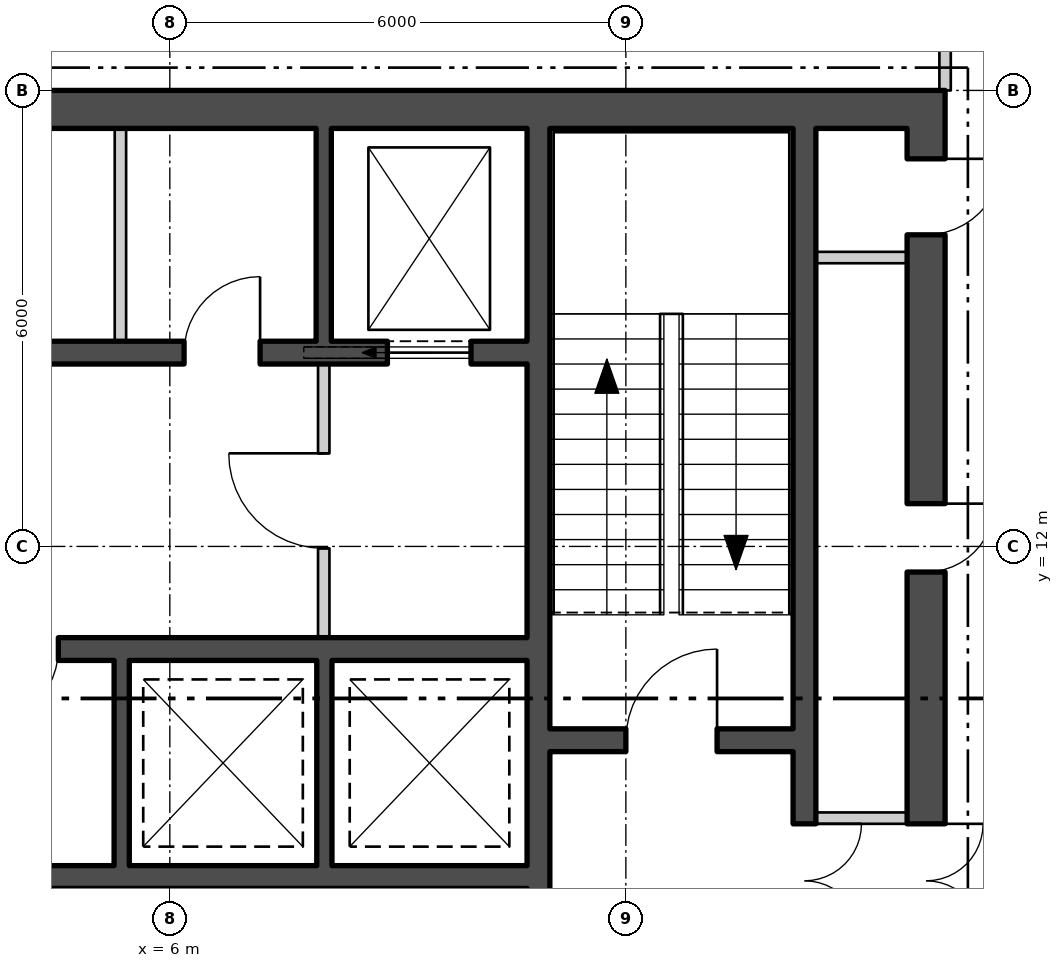
"""IFC4 building model, lengths in metres.
Left out: names, types, materials, properties, quantities, classifications, styles, units other than length and angle.
Written with IfcOpenShell. Run it as: python <this file> out.ifc"""

import sys

from ifc_helpers import new_model, si_unit, direction, frame, frame_2d, origin, place, context, subcontext, project, spatial, polyline, rectangle, outline, extrude, element, fill, save


model = new_model("IFC4")
c1 = context("Model", 3, precision=1e-05, world=origin(), true_north=direction((0.0, 1.0)))
c2 = subcontext(c1, "Body", "Model", "MODEL_VIEW")
j1 = project(units=[si_unit("LENGTHUNIT", "METRE"), si_unit("PLANEANGLEUNIT", "RADIAN")], contexts=[c1])
p1 = place(None, origin())
s1 = spatial("IfcSite", under=j1, at=p1, CompositionType="ELEMENT")
p2 = place(p1, origin())
s2 = spatial("IfcBuilding", under=s1, at=p2, CompositionType="ELEMENT")
p3 = place(p2, frame((0.0, 0.0, 163.2)))
s3 = spatial("IfcBuildingStorey", under=s2, at=p3, CompositionType="ELEMENT", Elevation=163.2)
p4 = place(p3, frame((4.055, -26.661, -0.18), z_axis=(0.0, 0.0, 1.0), x_axis=(0.499999764979, 0.866025539474, 0.0)))
e1 = element("IfcWall", 1, at=p4, inside=s3, PredefinedType="SOLIDWALL", context=c2, shape_type="SweptSolid", body=[
    extrude(outline(polyline([(-0.13, -0.225), (45.87, -0.225), (45.61, 0.225), (0.13, 0.225), (-0.13, -0.225)])), origin(), (0.0, 0.0, 1.0), 3.68),
])
p5 = place(p4, frame((1.424, 0.0, 1.08)))
e2 = element("IfcOpeningElement", 2, at=p5, cuts=e1, PredefinedType="OPENING", context=c2, shape_type="SweptSolid", body=[
    extrude(rectangle(XDim=2.4, YDim=2.0, at=frame_2d((1.2, 1.0))), frame((0.0, 0.235, 0.0), z_axis=(0.0, -1.0, 0.0), x_axis=(1.0, 0.0, 0.0)), (0.0, 0.0, 1.0), 0.47),
])
p6 = place(p4, frame((5.893, 0.0, 1.08)))
e3 = element("IfcOpeningElement", 3, at=p6, cuts=e1, PredefinedType="OPENING", context=c2, shape_type="SweptSolid", body=[
    extrude(rectangle(XDim=2.4, YDim=2.0, at=frame_2d((1.2, 1.0))), frame((0.0, 0.235, 0.0), z_axis=(0.0, -1.0, 0.0), x_axis=(1.0, 0.0, 0.0)), (0.0, 0.0, 1.0), 0.47),
])
p7 = place(p4, frame((10.401, 0.0, 1.08)))
e4 = element("IfcOpeningElement", 4, at=p7, cuts=e1, PredefinedType="OPENING", context=c2, shape_type="SweptSolid", body=[
    extrude(rectangle(XDim=2.4, YDim=2.0, at=frame_2d((1.2, 1.0))), frame((0.0, 0.235, 0.0), z_axis=(0.0, -1.0, 0.0), x_axis=(1.0, 0.0, 0.0)), (0.0, 0.0, 1.0), 0.47),
])
p8 = place(p4, frame((14.909, 0.0, 1.08)))
e5 = element("IfcOpeningElement", 5, at=p8, cuts=e1, PredefinedType="OPENING", context=c2, shape_type="SweptSolid", body=[
    extrude(rectangle(XDim=2.4, YDim=2.0, at=frame_2d((1.2, 1.0))), frame((0.0, 0.235, 0.0), z_axis=(0.0, -1.0, 0.0), x_axis=(1.0, 0.0, 0.0)), (0.0, 0.0, 1.0), 0.47),
])
p9 = place(p4, frame((19.416, 0.0, 1.08)))
e6 = element("IfcOpeningElement", 6, at=p9, cuts=e1, PredefinedType="OPENING", context=c2, shape_type="SweptSolid", body=[
    extrude(rectangle(XDim=2.4, YDim=2.0, at=frame_2d((1.2, 1.0))), frame((0.0, 0.235, 0.0), z_axis=(0.0, -1.0, 0.0), x_axis=(1.0, 0.0, 0.0)), (0.0, 0.0, 1.0), 0.47),
])
p10 = place(p4, frame((23.924, 0.0, 1.08)))
e7 = element("IfcOpeningElement", 7, at=p10, cuts=e1, PredefinedType="OPENING", context=c2, shape_type="SweptSolid", body=[
    extrude(rectangle(XDim=2.4, YDim=2.0, at=frame_2d((1.2, 1.0))), frame((0.0, 0.235, 0.0), z_axis=(0.0, -1.0, 0.0), x_axis=(1.0, 0.0, 0.0)), (0.0, 0.0, 1.0), 0.47),
])
p11 = place(p4, frame((28.431, 0.0, 1.08)))
e8 = element("IfcOpeningElement", 8, at=p11, cuts=e1, PredefinedType="OPENING", context=c2, shape_type="SweptSolid", body=[
    extrude(rectangle(XDim=2.4, YDim=2.0, at=frame_2d((1.2, 1.0))), frame((0.0, 0.235, 0.0), z_axis=(0.0, -1.0, 0.0), x_axis=(1.0, 0.0, 0.0)), (0.0, 0.0, 1.0), 0.47),
])
p12 = place(p4, frame((32.939, 0.0, 1.08)))
e9 = element("IfcOpeningElement", 9, at=p12, cuts=e1, PredefinedType="OPENING", context=c2, shape_type="SweptSolid", body=[
    extrude(rectangle(XDim=2.4, YDim=2.0, at=frame_2d((1.2, 1.0))), frame((0.0, 0.235, 0.0), z_axis=(0.0, -1.0, 0.0), x_axis=(1.0, 0.0, 0.0)), (0.0, 0.0, 1.0), 0.47),
])
p13 = place(p4, frame((37.447, 0.0, 1.08)))
e10 = element("IfcOpeningElement", 10, at=p13, cuts=e1, PredefinedType="OPENING", context=c2, shape_type="SweptSolid", body=[
    extrude(rectangle(XDim=2.4, YDim=2.0, at=frame_2d((1.2, 1.0))), frame((0.0, 0.235, 0.0), z_axis=(0.0, -1.0, 0.0), x_axis=(1.0, 0.0, 0.0)), (0.0, 0.0, 1.0), 0.47),
])
p14 = place(p4, frame((41.916, 0.0, 1.08)))
e11 = element("IfcOpeningElement", 11, at=p14, cuts=e1, PredefinedType="OPENING", context=c2, shape_type="SweptSolid", body=[
    extrude(rectangle(XDim=2.4, YDim=2.0, at=frame_2d((1.2, 1.0))), frame((0.0, 0.235, 0.0), z_axis=(0.0, -1.0, 0.0), x_axis=(1.0, 0.0, 0.0)), (0.0, 0.0, 1.0), 0.47),
])
p15 = place(p3, frame((-16.2, 17.75, 0.0), z_axis=(0.0, 0.0, 1.0), x_axis=(1.0, 0.0, 0.0)))
e12 = element("IfcWall", 12, at=p15, inside=s3, PredefinedType="SHEAR", context=c2, shape_type="SweptSolid", body=[
    extrude(rectangle(XDim=32.4, YDim=0.5, at=frame_2d((16.2, 0.0))), origin(), (0.0, 0.0, 1.0), 3.7),
])
p16 = place(p3, frame((15.95, 2.5, 0.0), z_axis=(0.0, 0.0, 1.0), x_axis=(0.0, 1.0, 0.0)))
e13 = element("IfcWall", 13, at=p16, inside=s3, PredefinedType="SHEAR", context=c2, shape_type="SweptSolid", body=[
    extrude(rectangle(XDim=15.0, YDim=0.5, at=frame_2d((7.5, 0.0))), origin(), (0.0, 0.0, 1.0), 3.7),
])
p17 = place(p16, frame((4.35, 0.0, 0.0)))
e14 = element("IfcOpeningElement", 14, at=p17, cuts=e13, PredefinedType="OPENING", context=c2, shape_type="SweptSolid", body=[
    extrude(rectangle(XDim=1.5, YDim=2.1, at=frame_2d((0.75, 1.05))), frame((0.0, 0.26, 0.0), z_axis=(0.0, -1.0, 0.0), x_axis=(1.0, 0.0, 0.0)), (0.0, 0.0, 1.0), 0.52),
])
p18 = place(p16, frame((0.4, 0.0, 0.0)))
e15 = element("IfcOpeningElement", 15, at=p18, cuts=e13, PredefinedType="OPENING", context=c2, shape_type="SweptSolid", body=[
    extrude(rectangle(XDim=0.9, YDim=2.1, at=frame_2d((0.45, 1.05))), frame((0.0, 0.26, 0.0), z_axis=(0.0, -1.0, 0.0), x_axis=(1.0, 0.0, 0.0)), (0.0, 0.0, 1.0), 0.52),
])
p19 = place(p16, frame((2.475, 0.0, 0.0)))
e16 = element("IfcOpeningElement", 16, at=p19, cuts=e13, PredefinedType="OPENING", context=c2, shape_type="SweptSolid", body=[
    extrude(rectangle(XDim=0.9, YDim=2.1, at=frame_2d((0.45, 1.05))), frame((0.0, 0.26, 0.0), z_axis=(0.0, -1.0, 0.0), x_axis=(1.0, 0.0, 0.0)), (0.0, 0.0, 1.0), 0.52),
])
p20 = place(p16, frame((9.163, 0.0, 0.0)))
e17 = element("IfcOpeningElement", 17, at=p20, cuts=e13, PredefinedType="OPENING", context=c2, shape_type="SweptSolid", body=[
    extrude(rectangle(XDim=0.9, YDim=2.1, at=frame_2d((0.45, 1.05))), frame((0.0, 0.26, 0.0), z_axis=(0.0, -1.0, 0.0), x_axis=(1.0, 0.0, 0.0)), (0.0, 0.0, 1.0), 0.52),
])
p21 = place(p16, frame((13.6, 0.0, 0.0)))
e18 = element("IfcOpeningElement", 18, at=p21, cuts=e13, PredefinedType="OPENING", context=c2, shape_type="SweptSolid", body=[
    extrude(rectangle(XDim=1.0, YDim=2.1, at=frame_2d((0.5, 1.05))), frame((0.0, 0.26, 0.0), z_axis=(0.0, -1.0, 0.0), x_axis=(1.0, 0.0, 0.0)), (0.0, 0.0, 1.0), 0.52),
])
p22 = place(p3, frame((10.85, 2.5, 0.0), z_axis=(0.0, 0.0, 1.0), x_axis=(0.0, 1.0, 0.0)))
e19 = element("IfcWall", 19, at=p22, inside=s3, PredefinedType="SHEAR", context=c2, shape_type="SweptSolid", body=[
    extrude(rectangle(XDim=15.0, YDim=0.3, at=frame_2d((7.5, 0.0))), origin(), (0.0, 0.0, 1.0), 3.7),
])
p23 = place(p22, frame((3.475, 0.0, 0.0)))
e20 = element("IfcOpeningElement", 20, at=p23, cuts=e19, PredefinedType="OPENING", context=c2, shape_type="SweptSolid", body=[
    extrude(rectangle(XDim=1.25, YDim=2.1, at=frame_2d((0.625, 1.05))), frame((0.0, 0.16, 0.0), z_axis=(0.0, -1.0, 0.0), x_axis=(1.0, 0.0, 0.0)), (0.0, 0.0, 1.0), 0.32),
])
p24 = place(p22, frame((1.125, 0.0, 0.0)))
e21 = element("IfcOpeningElement", 21, at=p24, cuts=e19, PredefinedType="OPENING", context=c2, shape_type="SweptSolid", body=[
    extrude(rectangle(XDim=1.0, YDim=2.1, at=frame_2d((0.5, 1.05))), frame((0.0, 0.16, 0.0), z_axis=(0.0, -1.0, 0.0), x_axis=(1.0, 0.0, 0.0)), (0.0, 0.0, 1.0), 0.32),
])
p25 = place(p3, frame((14.35, 2.5, 0.0), z_axis=(0.0, 0.0, 1.0), x_axis=(0.0, 1.0, 0.0)))
e22 = element("IfcWall", 22, at=p25, inside=s3, PredefinedType="SHEAR", context=c2, shape_type="SweptSolid", body=[
    extrude(rectangle(XDim=15.0, YDim=0.3, at=frame_2d((7.5, 0.0))), origin(), (0.0, 0.0, 1.0), 3.7),
])
p26 = place(p25, frame((4.35, 0.0, 0.0)))
e23 = element("IfcOpeningElement", 23, at=p26, cuts=e22, PredefinedType="OPENING", context=c2, shape_type="SweptSolid", body=[
    extrude(rectangle(XDim=1.5, YDim=2.1, at=frame_2d((0.75, 1.05))), frame((0.0, 0.16, 0.0), z_axis=(0.0, -1.0, 0.0), x_axis=(1.0, 0.0, 0.0)), (0.0, 0.0, 1.0), 0.32),
])
p27 = place(p3, frame((11.0, 9.45, 0.0), z_axis=(0.0, 0.0, 1.0), x_axis=(1.0, 0.0, 0.0)))
e24 = element("IfcWall", 24, at=p27, inside=s3, PredefinedType="SHEAR", context=c2, shape_type="SweptSolid", body=[
    extrude(rectangle(XDim=3.2, YDim=0.3, at=frame_2d((1.6, 0.0))), origin(), (0.0, 0.0, 1.0), 3.7),
])
p28 = place(p27, frame((1.0, 0.0, 0.0)))
e25 = element("IfcOpeningElement", 25, at=p28, cuts=e24, PredefinedType="OPENING", context=c2, shape_type="SweptSolid", body=[
    extrude(rectangle(XDim=1.2, YDim=2.1, at=frame_2d((0.6, 1.05))), frame((0.0, 0.16, 0.0), z_axis=(0.0, -1.0, 0.0), x_axis=(1.0, 0.0, 0.0)), (0.0, 0.0, 1.0), 0.32),
])
p29 = place(p3, frame((-10.7, 14.55, 0.0), z_axis=(0.0, 0.0, 1.0), x_axis=(1.0, 0.0, 0.0)))
e26 = element("IfcWall", 26, at=p29, inside=s3, PredefinedType="SHEAR", context=c2, shape_type="SweptSolid", body=[
    extrude(rectangle(XDim=21.4, YDim=0.3, at=frame_2d((10.7, 0.0))), origin(), (0.0, 0.0, 1.0), 3.7),
])
p30 = place(p29, frame((0.738, 0.0, 0.0)))
e27 = element("IfcOpeningElement", 27, at=p30, cuts=e26, PredefinedType="OPENING", context=c2, shape_type="SweptSolid", body=[
    extrude(rectangle(XDim=1.1, YDim=2.1, at=frame_2d((0.55, 1.05))), frame((0.0, 0.16, 0.0), z_axis=(0.0, -1.0, 0.0), x_axis=(1.0, 0.0, 0.0)), (0.0, 0.0, 1.0), 0.32),
])
p31 = place(p29, frame((3.462, 0.0, 0.0)))
e28 = element("IfcOpeningElement", 28, at=p31, cuts=e26, PredefinedType="OPENING", context=c2, shape_type="SweptSolid", body=[
    extrude(rectangle(XDim=1.1, YDim=2.1, at=frame_2d((0.55, 1.05))), frame((0.0, 0.16, 0.0), z_axis=(0.0, -1.0, 0.0), x_axis=(1.0, 0.0, 0.0)), (0.0, 0.0, 1.0), 0.32),
])
p32 = place(p29, frame((6.138, 0.0, 0.0)))
e29 = element("IfcOpeningElement", 29, at=p32, cuts=e26, PredefinedType="OPENING", context=c2, shape_type="SweptSolid", body=[
    extrude(rectangle(XDim=1.1, YDim=2.1, at=frame_2d((0.55, 1.05))), frame((0.0, 0.16, 0.0), z_axis=(0.0, -1.0, 0.0), x_axis=(1.0, 0.0, 0.0)), (0.0, 0.0, 1.0), 0.32),
])
p33 = place(p29, frame((8.812, 0.0, 0.0)))
e30 = element("IfcOpeningElement", 30, at=p33, cuts=e26, PredefinedType="OPENING", context=c2, shape_type="SweptSolid", body=[
    extrude(rectangle(XDim=1.1, YDim=2.1, at=frame_2d((0.55, 1.05))), frame((0.0, 0.16, 0.0), z_axis=(0.0, -1.0, 0.0), x_axis=(1.0, 0.0, 0.0)), (0.0, 0.0, 1.0), 0.32),
])
p34 = place(p29, frame((19.562, 0.0, 0.0)))
e31 = element("IfcOpeningElement", 31, at=p34, cuts=e26, PredefinedType="OPENING", context=c2, shape_type="SweptSolid", body=[
    extrude(rectangle(XDim=1.1, YDim=2.1, at=frame_2d((0.55, 1.05))), frame((0.0, 0.16, 0.0), z_axis=(0.0, -1.0, 0.0), x_axis=(1.0, 0.0, 0.0)), (0.0, 0.0, 1.0), 0.32),
])
p35 = place(p29, frame((12.875, 0.0, 0.0)))
e32 = element("IfcOpeningElement", 32, at=p35, cuts=e26, PredefinedType="OPENING", context=c2, shape_type="SweptSolid", body=[
    extrude(rectangle(XDim=1.0, YDim=2.1, at=frame_2d((0.5, 1.05))), frame((0.0, 0.16, 0.0), z_axis=(0.0, -1.0, 0.0), x_axis=(1.0, 0.0, 0.0)), (0.0, 0.0, 1.0), 0.32),
])
p36 = place(p29, frame((16.887, 0.0, 0.0)))
e33 = element("IfcOpeningElement", 33, at=p36, cuts=e26, PredefinedType="OPENING", context=c2, shape_type="SweptSolid", body=[
    extrude(rectangle(XDim=1.0, YDim=2.1, at=frame_2d((0.5, 1.05))), frame((0.0, 0.16, 0.0), z_axis=(0.0, -1.0, 0.0), x_axis=(1.0, 0.0, 0.0)), (0.0, 0.0, 1.0), 0.32),
])
p37 = place(p3, frame((2.6, 10.65, 0.0), z_axis=(0.0, 0.0, 1.0), x_axis=(1.0, 0.0, 0.0)))
e34 = element("IfcWall", 34, at=p37, inside=s3, PredefinedType="SHEAR", context=c2, shape_type="SweptSolid", body=[
    extrude(rectangle(XDim=8.1, YDim=0.3, at=frame_2d((4.05, 0.0))), origin(), (0.0, 0.0, 1.0), 3.7),
])
p38 = place(p37, frame((0.933, 0.0, 0.0)))
e35 = element("IfcOpeningElement", 35, at=p38, cuts=e34, PredefinedType="OPENING", context=c2, shape_type="SweptSolid", body=[
    extrude(rectangle(XDim=1.0, YDim=2.1, at=frame_2d((0.5, 1.05))), frame((0.0, 0.16, 0.0), z_axis=(0.0, -1.0, 0.0), x_axis=(1.0, 0.0, 0.0)), (0.0, 0.0, 1.0), 0.32),
])
p39 = place(p3, frame((2.6, 7.65, 0.0), z_axis=(0.0, 0.0, 1.0), x_axis=(1.0, 0.0, 0.0)))
e36 = element("IfcWall", 36, at=p39, inside=s3, PredefinedType="SHEAR", context=c2, shape_type="SweptSolid", body=[
    extrude(rectangle(XDim=8.1, YDim=0.3, at=frame_2d((4.05, 0.0))), origin(), (0.0, 0.0, 1.0), 3.7),
])
p40 = place(p3, frame((5.35, 14.7, 0.0), z_axis=(0.0, 0.0, 1.0), x_axis=(0.0, 1.0, 0.0)))
e37 = element("IfcWall", 37, at=p40, inside=s3, PredefinedType="PARTITIONING", context=c2, shape_type="SweptSolid", body=[
    extrude(rectangle(XDim=2.8, YDim=0.15, at=frame_2d((1.4, 0.0))), origin(), (0.0, 0.0, 1.0), 3.7),
])
p41 = place(p3, frame((8.025, 14.7, 0.0), z_axis=(0.0, 0.0, 1.0), x_axis=(0.0, 1.0, 0.0)))
e38 = element("IfcWall", 38, at=p41, inside=s3, PredefinedType="SHEAR", context=c2, shape_type="SweptSolid", body=[
    extrude(rectangle(XDim=2.8, YDim=0.2, at=frame_2d((1.4, 0.0))), origin(), (0.0, 0.0, 1.0), 3.7),
])
for number, where, z_axis, x_axis in (
    (39, (5.367, 7.8, 0.0), (0.0, 0.0, 1.0), (0.0, 1.0, 0.0)),
    (40, (8.033, 7.8, 0.0), (0.0, 0.0, 1.0), (0.0, 1.0, 0.0)),
):
    element("IfcWall", number, at=place(p3, frame(where, z_axis=z_axis, x_axis=x_axis)), inside=s3, PredefinedType="SHEAR", context=c2, shape_type="SweptSolid", body=[
        extrude(rectangle(XDim=2.7, YDim=0.2, at=frame_2d((1.35, 0.0))), origin(), (0.0, 0.0, 1.0), 3.7),
    ])
p42 = place(p3, frame((8.025, 10.8, 0.0), z_axis=(0.0, 0.0, 1.0), x_axis=(0.0, 1.0, 0.0)))
e41 = element("IfcWall", 41, at=p42, inside=s3, PredefinedType="PARTITIONING", context=c2, shape_type="SweptSolid", body=[
    extrude(rectangle(XDim=3.6, YDim=0.15, at=frame_2d((1.8, 0.0))), origin(), (0.0, 0.0, 1.0), 3.7),
])
p43 = place(p42, frame((1.175, 0.0, 0.0)))
e42 = element("IfcOpeningElement", 42, at=p43, cuts=e41, PredefinedType="OPENING", context=c2, shape_type="SweptSolid", body=[
    extrude(rectangle(XDim=1.25, YDim=2.1, at=frame_2d((0.625, 1.05))), frame((0.0, 0.085, 0.0), z_axis=(0.0, -1.0, 0.0), x_axis=(1.0, 0.0, 0.0)), (0.0, 0.0, 1.0), 0.17),
])
for number, where, z_axis, x_axis in (
    (43, (14.5, 8.425, 0.0), (0.0, 0.0, 1.0), (1.0, 0.0, 0.0)),
    (44, (14.5, 15.801, 0.0), (0.0, 0.0, 1.0), (1.0, 0.0, 0.0)),
):
    element("IfcWall", number, at=place(p3, frame(where, z_axis=z_axis, x_axis=x_axis)), inside=s3, PredefinedType="PARTITIONING", context=c2, shape_type="SweptSolid", body=[
        extrude(rectangle(XDim=1.2, YDim=0.15, at=frame_2d((0.6, 0.0))), origin(), (0.0, 0.0, 1.0), 3.7),
    ])
p44 = place(p3, frame((16.2, 18.0, 0.0), z_axis=(0.0, 0.0, 1.0), x_axis=(0.0, 1.0, 0.0)))
e45 = element("IfcWall", 45, at=p44, inside=s3, PredefinedType="PARTITIONING", context=c2, shape_type="SweptSolid", body=[
    extrude(rectangle(XDim=1.75, YDim=0.15, at=frame_2d((0.875, 0.0))), origin(), (0.0, 0.0, 1.0), 3.7),
])
p45 = place(p34, origin())
e46 = element("IfcDoor", 46, at=p45, inside=s3, OperationType="SLIDING_TO_LEFT", PredefinedType="DOOR", context=c2, shape_type="SweptSolid", body=[
    extrude(rectangle(XDim=1.1, YDim=2.1, at=frame_2d((0.55, 1.05))), frame((0.0, 0.025, 0.0), z_axis=(0.0, -1.0, 0.0), x_axis=(1.0, 0.0, 0.0)), (0.0, 0.0, 1.0), 0.05),
])
fill(e31, e46)
p46 = place(p36, origin())
e47 = element("IfcDoor", 47, at=p46, inside=s3, OperationType="SINGLE_SWING_LEFT", PredefinedType="DOOR", context=c2, shape_type="SweptSolid", body=[
    extrude(rectangle(XDim=1.0, YDim=2.1, at=frame_2d((0.5, 1.05))), frame((0.0, 0.025, 0.0), z_axis=(0.0, -1.0, 0.0), x_axis=(1.0, 0.0, 0.0)), (0.0, 0.0, 1.0), 0.05),
])
fill(e33, e47)
p47 = place(p38, origin())
e48 = element("IfcDoor", 48, at=p47, inside=s3, OperationType="SINGLE_SWING_LEFT", PredefinedType="DOOR", context=c2, shape_type="SweptSolid", body=[
    extrude(rectangle(XDim=1.0, YDim=2.1, at=frame_2d((0.5, 1.05))), frame((0.0, 0.025, 0.0), z_axis=(0.0, -1.0, 0.0), x_axis=(1.0, 0.0, 0.0)), (0.0, 0.0, 1.0), 0.05),
])
fill(e35, e48)
p48 = place(p43, origin())
e49 = element("IfcDoor", 49, at=p48, inside=s3, OperationType="SINGLE_SWING_LEFT", PredefinedType="DOOR", context=c2, shape_type="SweptSolid", body=[
    extrude(rectangle(XDim=1.25, YDim=2.1, at=frame_2d((0.625, 1.05))), frame((0.0, 0.025, 0.0), z_axis=(0.0, -1.0, 0.0), x_axis=(1.0, 0.0, 0.0)), (0.0, 0.0, 1.0), 0.05),
])
fill(e42, e49)
p49 = place(p28, origin())
e50 = element("IfcDoor", 50, at=p49, inside=s3, OperationType="SINGLE_SWING_LEFT", PredefinedType="DOOR", context=c2, shape_type="SweptSolid", body=[
    extrude(rectangle(XDim=1.2, YDim=2.1, at=frame_2d((0.6, 1.05))), frame((0.0, 0.025, 0.0), z_axis=(0.0, -1.0, 0.0), x_axis=(1.0, 0.0, 0.0)), (0.0, 0.0, 1.0), 0.05),
])
fill(e25, e50)
p50 = place(p26, origin())
e51 = element("IfcDoor", 51, at=p50, inside=s3, OperationType="DOUBLE_DOOR_SINGLE_SWING", PredefinedType="DOOR", context=c2, shape_type="SweptSolid", body=[
    extrude(rectangle(XDim=1.5, YDim=2.1, at=frame_2d((0.75, 1.05))), frame((0.0, 0.025, 0.0), z_axis=(0.0, -1.0, 0.0), x_axis=(1.0, 0.0, 0.0)), (0.0, 0.0, 1.0), 0.05),
])
fill(e23, e51)
p51 = place(p17, origin())
e52 = element("IfcDoor", 52, at=p51, inside=s3, OperationType="DOUBLE_DOOR_SINGLE_SWING", PredefinedType="DOOR", context=c2, shape_type="SweptSolid", body=[
    extrude(rectangle(XDim=1.5, YDim=2.1, at=frame_2d((0.75, 1.05))), frame((0.0, 0.025, 0.0), z_axis=(0.0, -1.0, 0.0), x_axis=(1.0, 0.0, 0.0)), (0.0, 0.0, 1.0), 0.05),
])
fill(e14, e52)
p52 = place(p20, origin())
e53 = element("IfcDoor", 53, at=p52, inside=s3, OperationType="SINGLE_SWING_RIGHT", PredefinedType="DOOR", context=c2, shape_type="SweptSolid", body=[
    extrude(rectangle(XDim=0.9, YDim=2.1, at=frame_2d((0.45, 1.05))), frame((0.0, 0.025, 0.0), z_axis=(0.0, -1.0, 0.0), x_axis=(1.0, 0.0, 0.0)), (0.0, 0.0, 1.0), 0.05),
])
fill(e17, e53)
p53 = place(p21, origin())
e54 = element("IfcDoor", 54, at=p53, inside=s3, OperationType="SINGLE_SWING_RIGHT", PredefinedType="DOOR", context=c2, shape_type="SweptSolid", body=[
    extrude(rectangle(XDim=1.0, YDim=2.1, at=frame_2d((0.5, 1.05))), frame((0.0, 0.025, 0.0), z_axis=(0.0, -1.0, 0.0), x_axis=(1.0, 0.0, 0.0)), (0.0, 0.0, 1.0), 0.05),
])
fill(e18, e54)
save(model, sys.argv[1])
